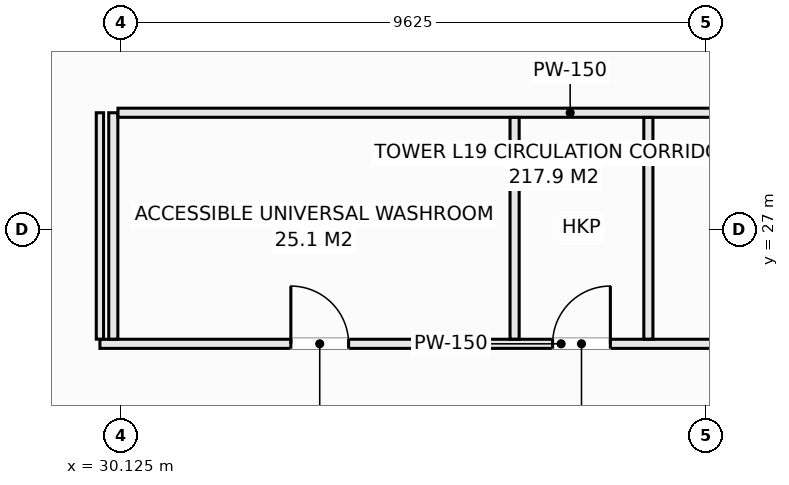
"""IFC4 building model, lengths in metres.
Left out: names, types, materials, properties, quantities, classifications, styles, units other than length and angle.
Written with IfcOpenShell. Run it as: python <this file> out.ifc"""

import sys

from ifc_helpers import new_model, si_unit, direction, frame, frame_2d, origin, place, context, subcontext, project, spatial, rectangle, extrude, element, fill, save


model = new_model("IFC4")
c1 = context("Model", 3, precision=1e-05, world=origin(), true_north=direction((0.0, 1.0)))
c2 = subcontext(c1, "Body", "Model", "MODEL_VIEW")
j1 = project(units=[si_unit("LENGTHUNIT", "METRE"), si_unit("PLANEANGLEUNIT", "RADIAN")], contexts=[c1])
p1 = place(None, origin())
s1 = spatial("IfcSite", under=j1, at=p1, CompositionType="ELEMENT")
p2 = place(p1, origin())
s2 = spatial("IfcBuilding", under=s1, at=p2, CompositionType="ELEMENT")
p3 = place(p2, frame((0.0, 0.0, 80.4)))
s3 = spatial("IfcBuildingStorey", under=s2, at=p3, CompositionType="ELEMENT", Elevation=80.4)
p4 = place(p3, frame((29.78, 25.12, 0.0), z_axis=(0.0, 0.0, 1.0), x_axis=(1.0, 0.0, 0.0)))
e1 = element("IfcWall", 1, at=p4, inside=s3, PredefinedType="PARTITIONING", context=c2, shape_type="SweptSolid", body=[
    extrude(rectangle(XDim=15.17, YDim=0.15, at=frame_2d((7.585, 0.0))), origin(), (0.0, 0.0, 1.0), 3.57),
])
p5 = place(p4, frame((3.14, 0.0, 0.0)))
e2 = element("IfcOpeningElement", 2, at=p5, cuts=e1, PredefinedType="OPENING", context=c2, shape_type="SweptSolid", body=[
    extrude(rectangle(XDim=0.95, YDim=2.1, at=frame_2d((0.475, 1.05))), frame((0.0, 0.085, 0.0), z_axis=(0.0, -1.0, 0.0), x_axis=(1.0, 0.0, 0.0)), (0.0, 0.0, 1.0), 0.17),
])
p6 = place(p4, frame((7.445, 0.0, 0.0)))
e3 = element("IfcOpeningElement", 3, at=p6, cuts=e1, PredefinedType="OPENING", context=c2, shape_type="SweptSolid", body=[
    extrude(rectangle(XDim=0.95, YDim=2.1, at=frame_2d((0.475, 1.05))), frame((0.0, 0.085, 0.0), z_axis=(0.0, -1.0, 0.0), x_axis=(1.0, 0.0, 0.0)), (0.0, 0.0, 1.0), 0.17),
])
p7 = place(p4, frame((10.995, 0.0, 0.0)))
e4 = element("IfcOpeningElement", 4, at=p7, cuts=e1, PredefinedType="OPENING", context=c2, shape_type="SweptSolid", body=[
    extrude(rectangle(XDim=0.95, YDim=2.1, at=frame_2d((0.475, 1.05))), frame((0.0, 0.085, 0.0), z_axis=(0.0, -1.0, 0.0), x_axis=(1.0, 0.0, 0.0)), (0.0, 0.0, 1.0), 0.17),
])
p8 = place(p3, frame((30.0, 25.197, 0.0), z_axis=(0.0, 0.0, 1.0), x_axis=(0.0, 1.0, 0.0)))
e5 = element("IfcWall", 5, at=p8, inside=s3, PredefinedType="PARTITIONING", context=c2, shape_type="SweptSolid", body=[
    extrude(rectangle(XDim=3.723, YDim=0.15, at=frame_2d((1.861, 0.0))), origin(), (0.0, 0.0, 1.0), 3.57),
])
p9 = place(p3, frame((30.077, 28.92, 0.0), z_axis=(0.0, 0.0, 1.0), x_axis=(1.0, 0.0, 0.0)))
e6 = element("IfcWall", 6, at=p9, inside=s3, PredefinedType="PARTITIONING", context=c2, shape_type="SweptSolid", body=[
    extrude(rectangle(XDim=14.873, YDim=0.15, at=frame_2d((7.437, 0.0))), origin(), (0.0, 0.0, 1.0), 3.57),
])
for number, where, z_axis, x_axis in (
    (7, (36.6, 25.197, 0.0), (0.0, 0.0, 1.0), (0.0, 1.0, 0.0)),
    (8, (38.8, 25.197, 0.0), (0.0, 0.0, 1.0), (0.0, 1.0, 0.0)),
):
    element("IfcWall", number, at=place(p3, frame(where, z_axis=z_axis, x_axis=x_axis)), inside=s3, PredefinedType="PARTITIONING", context=c2, shape_type="SweptSolid", body=[
        extrude(rectangle(XDim=3.646, YDim=0.15, at=frame_2d((1.823, 0.0))), origin(), (0.0, 0.0, 1.0), 3.57),
    ])
p10 = place(p3, frame((29.78, 25.197, 0.0), z_axis=(0.0, 0.0, 1.0), x_axis=(0.0, 1.0, 0.0)))
e9 = element("IfcWall", 9, at=p10, inside=s3, PredefinedType="PARTITIONING", context=c2, shape_type="SweptSolid", body=[
    extrude(rectangle(XDim=3.723, YDim=0.12, at=frame_2d((1.861, 0.0))), origin(), (0.0, 0.0, 1.0), 3.57),
])
p11 = place(p5, origin())
e10 = element("IfcDoor", 10, at=p11, inside=s3, OperationType="SINGLE_SWING_LEFT", PredefinedType="DOOR", context=c2, shape_type="SweptSolid", body=[
    extrude(rectangle(XDim=0.95, YDim=2.1, at=frame_2d((0.475, 1.05))), frame((0.0, 0.025, 0.0), z_axis=(0.0, -1.0, 0.0), x_axis=(1.0, 0.0, 0.0)), (0.0, 0.0, 1.0), 0.05),
])
fill(e2, e10)
p12 = place(p6, origin())
e11 = element("IfcDoor", 11, at=p12, inside=s3, OperationType="SINGLE_SWING_RIGHT", PredefinedType="DOOR", context=c2, shape_type="SweptSolid", body=[
    extrude(rectangle(XDim=0.95, YDim=2.1, at=frame_2d((0.475, 1.05))), frame((0.0, 0.025, 0.0), z_axis=(0.0, -1.0, 0.0), x_axis=(1.0, 0.0, 0.0)), (0.0, 0.0, 1.0), 0.05),
])
fill(e3, e11)
save(model, sys.argv[1])
